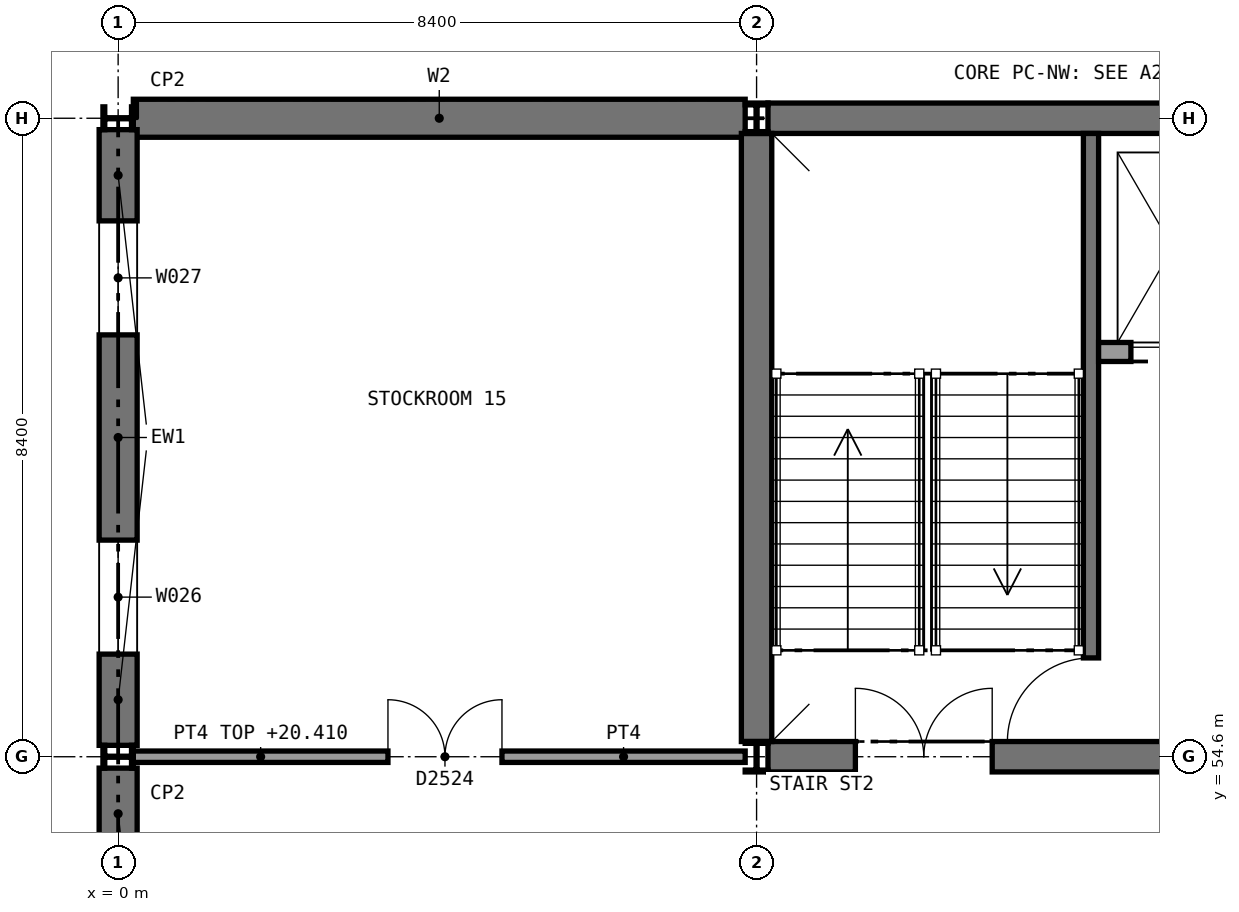
"""IFC4 building model, lengths in metres.
Left out: names, types, materials, properties, quantities, classifications, styles, units other than length and angle.
Written with IfcOpenShell. Run it as: python <this file> out.ifc"""

import sys

from ifc_helpers import new_model, si_unit, direction, frame, frame_2d, origin, origin_2d, place, context, subcontext, project, spatial, rectangle, i_section, extrude, element, fill, save


model = new_model("IFC4")
c1 = context("Model", 3, precision=1e-05, world=origin(), true_north=direction((0.0, 1.0)))
c2 = subcontext(c1, "Body", "Model", "MODEL_VIEW")
j1 = project(units=[si_unit("LENGTHUNIT", "METRE"), si_unit("PLANEANGLEUNIT", "RADIAN")], contexts=[c1])
p1 = place(None, origin())
s1 = spatial("IfcSite", under=j1, at=p1, CompositionType="ELEMENT")
p2 = place(p1, origin())
s2 = spatial("IfcBuilding", under=s1, at=p2, CompositionType="ELEMENT")
p3 = place(p2, frame((0.0, 0.0, 16.2)))
s3 = spatial("IfcBuildingStorey", under=s2, at=p3, CompositionType="ELEMENT", Elevation=16.2)
p4 = place(p3, frame((0.2, 63.0, 0.0), z_axis=(0.0, 0.0, 1.0), x_axis=(1.0, 0.0, 0.0)))
e1 = element("IfcWall", 1, at=p4, inside=s3, PredefinedType="SHEAR", context=c2, shape_type="SweptSolid", body=[
    extrude(rectangle(XDim=8.05, YDim=0.5, at=frame_2d((4.025, 0.0))), origin(), (0.0, 0.0, 1.0), 4.65),
])
p5 = place(p3, frame((8.55, 63.0, 0.0), z_axis=(0.0, 0.0, 1.0), x_axis=(1.0, 0.0, 0.0)))
e2 = element("IfcWall", 2, at=p5, inside=s3, PredefinedType="SHEAR", context=c2, shape_type="SweptSolid", body=[
    extrude(rectangle(XDim=8.1, YDim=0.4, at=frame_2d((4.05, 0.0))), origin(), (0.0, 0.0, 1.0), 4.65),
])
p6 = place(p3, frame((8.55, 54.6, 0.0), z_axis=(0.0, 0.0, 1.0), x_axis=(1.0, 0.0, 0.0)))
e3 = element("IfcWall", 3, at=p6, inside=s3, PredefinedType="SHEAR", context=c2, shape_type="SweptSolid", body=[
    extrude(rectangle(XDim=8.1, YDim=0.4, at=frame_2d((4.05, 0.0))), origin(), (0.0, 0.0, 1.0), 4.65),
])
p7 = place(p6, frame((1.15, 0.0, 0.0)))
e4 = element("IfcOpeningElement", 4, at=p7, cuts=e3, PredefinedType="OPENING", context=c2, shape_type="SweptSolid", body=[
    extrude(rectangle(XDim=1.8, YDim=2.1, at=frame_2d((0.9, 1.05))), frame((0.0, 0.21, 0.0), z_axis=(0.0, -1.0, 0.0), x_axis=(1.0, 0.0, 0.0)), (0.0, 0.0, 1.0), 0.42),
])
p8 = place(p6, frame((5.3, 0.0, 0.0)))
e5 = element("IfcOpeningElement", 5, at=p8, cuts=e3, PredefinedType="OPENING", context=c2, shape_type="SweptSolid", body=[
    extrude(rectangle(XDim=1.8, YDim=2.1, at=frame_2d((0.9, 1.05))), frame((0.0, 0.21, 0.0), z_axis=(0.0, -1.0, 0.0), x_axis=(1.0, 0.0, 0.0)), (0.0, 0.0, 1.0), 0.42),
])
p9 = place(p3, frame((8.4, 54.8, 0.0), z_axis=(0.0, 0.0, 1.0), x_axis=(0.0, 1.0, 0.0)))
e6 = element("IfcWall", 6, at=p9, inside=s3, PredefinedType="SHEAR", context=c2, shape_type="SweptSolid", body=[
    extrude(rectangle(XDim=8.0, YDim=0.4, at=frame_2d((4.0, 0.0))), origin(), (0.0, 0.0, 1.0), 4.65),
])
for number, where, z_axis, x_axis in (
    (7, (0.0, 54.6, 0.0), (0.0, 0.0, 1.0), (0.0, 1.0, 0.0)),
    (8, (0.0, 63.0, 0.0), (0.0, 0.0, 1.0), (0.0, 1.0, 0.0)),
    (9, (8.4, 54.6, 0.0), (0.0, 0.0, 1.0), (1.0, 0.0, 0.0)),
    (10, (8.4, 63.0, 0.0), (0.0, 0.0, 1.0), (1.0, 0.0, 0.0)),
):
    element("IfcColumn", number, at=place(p3, frame(where, z_axis=z_axis, x_axis=x_axis)), inside=s3, PredefinedType="COLUMN", context=c2, shape_type="SweptSolid", body=[
        extrude(i_section(OverallWidth=0.3, OverallDepth=0.4, WebThickness=0.013, FlangeThickness=0.024, FilletRadius=0.027, at=origin_2d()), origin(), (0.0, 0.0, 1.0), 4.8),
    ])
p10 = place(p3, frame((0.2, 54.6, 0.0), z_axis=(0.0, 0.0, 1.0), x_axis=(1.0, 0.0, 0.0)))
e11 = element("IfcWall", 11, at=p10, inside=s3, PredefinedType="SOLIDWALL", context=c2, shape_type="SweptSolid", body=[
    extrude(rectangle(XDim=8.05, YDim=0.15, at=frame_2d((4.025, 0.0))), origin(), (0.0, 0.0, 1.0), 4.21),
])
p11 = place(p10, frame((3.35, 0.0, 0.0)))
e12 = element("IfcOpeningElement", 12, at=p11, cuts=e11, PredefinedType="OPENING", context=c2, shape_type="SweptSolid", body=[
    extrude(rectangle(XDim=1.5, YDim=2.1, at=frame_2d((0.75, 1.05))), frame((0.0, 0.085, 0.0), z_axis=(0.0, -1.0, 0.0), x_axis=(1.0, 0.0, 0.0)), (0.0, 0.0, 1.0), 0.17),
])
p12 = place(p3, frame((0.0, 46.35, 0.0), z_axis=(0.0, 0.0, 1.0), x_axis=(0.0, 1.0, 0.0)))
e13 = element("IfcWall", 13, at=p12, inside=s3, PredefinedType="STANDARD", context=c2, shape_type="SweptSolid", body=[
    extrude(rectangle(XDim=8.1, YDim=0.5, at=frame_2d((4.05, 0.0))), origin(), (0.0, 0.0, 1.0), 4.65),
])
p13 = place(p12, frame((1.2, 0.0, 1.0)))
e14 = element("IfcOpeningElement", 14, at=p13, cuts=e13, PredefinedType="OPENING", context=c2, shape_type="SweptSolid", body=[
    extrude(rectangle(XDim=1.5, YDim=2.7, at=frame_2d((0.75, 1.35))), frame((0.0, 0.26, 0.0), z_axis=(0.0, -1.0, 0.0), x_axis=(1.0, 0.0, 0.0)), (0.0, 0.0, 1.0), 0.52),
])
p14 = place(p12, frame((5.4, 0.0, 1.0)))
e15 = element("IfcOpeningElement", 15, at=p14, cuts=e13, PredefinedType="OPENING", context=c2, shape_type="SweptSolid", body=[
    extrude(rectangle(XDim=1.5, YDim=2.7, at=frame_2d((0.75, 1.35))), frame((0.0, 0.26, 0.0), z_axis=(0.0, -1.0, 0.0), x_axis=(1.0, 0.0, 0.0)), (0.0, 0.0, 1.0), 0.52),
])
p15 = place(p3, frame((0.0, 54.75, 0.0), z_axis=(0.0, 0.0, 1.0), x_axis=(0.0, 1.0, 0.0)))
e16 = element("IfcWall", 16, at=p15, inside=s3, PredefinedType="STANDARD", context=c2, shape_type="SweptSolid", body=[
    extrude(rectangle(XDim=8.1, YDim=0.5, at=frame_2d((4.05, 0.0))), origin(), (0.0, 0.0, 1.0), 4.65),
])
p16 = place(p15, frame((1.2, 0.0, 1.0)))
e17 = element("IfcOpeningElement", 17, at=p16, cuts=e16, PredefinedType="OPENING", context=c2, shape_type="SweptSolid", body=[
    extrude(rectangle(XDim=1.5, YDim=2.7, at=frame_2d((0.75, 1.35))), frame((0.0, 0.26, 0.0), z_axis=(0.0, -1.0, 0.0), x_axis=(1.0, 0.0, 0.0)), (0.0, 0.0, 1.0), 0.52),
])
p17 = place(p15, frame((5.4, 0.0, 1.0)))
e18 = element("IfcOpeningElement", 18, at=p17, cuts=e16, PredefinedType="OPENING", context=c2, shape_type="SweptSolid", body=[
    extrude(rectangle(XDim=1.5, YDim=2.7, at=frame_2d((0.75, 1.35))), frame((0.0, 0.26, 0.0), z_axis=(0.0, -1.0, 0.0), x_axis=(1.0, 0.0, 0.0)), (0.0, 0.0, 1.0), 0.52),
])
p18 = place(p3, frame((12.8, 62.8, 0.0), z_axis=(0.0, 0.0, 1.0), x_axis=(0.0, -1.0, 0.0)))
e19 = element("IfcWall", 19, at=p18, inside=s3, PredefinedType="SHEAR", context=c2, shape_type="SweptSolid", body=[
    extrude(rectangle(XDim=8.0, YDim=0.2, at=frame_2d((4.0, 0.0))), origin(), (0.0, 0.0, 1.0), 4.65),
])
p19 = place(p18, frame((6.9, 0.0, 0.0)))
e20 = element("IfcOpeningElement", 20, at=p19, cuts=e19, PredefinedType="OPENING", context=c2, shape_type="SweptSolid", body=[
    extrude(rectangle(XDim=1.11, YDim=2.1, at=frame_2d((0.555, 1.05))), frame((0.0, 0.11, 0.0), z_axis=(0.0, -1.0, 0.0), x_axis=(1.0, 0.0, 0.0)), (0.0, 0.0, 1.0), 0.22),
])
p20 = place(p3, frame((12.9, 59.925, 0.0), z_axis=(0.0, 0.0, 1.0), x_axis=(1.0, 0.0, 0.0)))
e21 = element("IfcWall", 21, at=p20, inside=s3, PredefinedType="SOLIDWALL", context=c2, shape_type="SweptSolid", body=[
    extrude(rectangle(XDim=1.95, YDim=0.25, at=frame_2d((0.975, 0.0))), origin(), (0.0, 0.0, 1.0), 4.8),
])
p21 = place(p20, frame((0.425, 0.0, 0.0)))
e22 = element("IfcOpeningElement", 22, at=p21, cuts=e21, PredefinedType="OPENING", context=c2, shape_type="SweptSolid", body=[
    extrude(rectangle(XDim=1.1, YDim=2.1, at=frame_2d((0.55, 1.05))), frame((0.0, 0.135, 0.0), z_axis=(0.0, -1.0, 0.0), x_axis=(1.0, 0.0, 0.0)), (0.0, 0.0, 1.0), 0.27),
])
p22 = place(p11, origin())
e23 = element("IfcDoor", 23, at=p22, inside=s3, OperationType="DOUBLE_DOOR_SINGLE_SWING", PredefinedType="DOOR", context=c2, shape_type="SweptSolid", body=[
    extrude(rectangle(XDim=1.5, YDim=2.1, at=frame_2d((0.75, 1.05))), frame((0.0, 0.025, 0.0), z_axis=(0.0, -1.0, 0.0), x_axis=(1.0, 0.0, 0.0)), (0.0, 0.0, 1.0), 0.05),
])
fill(e12, e23)
p23 = place(p16, origin())
e24 = element("IfcWindow", 24, at=p23, inside=s3, PartitioningType="SINGLE_PANEL", PredefinedType="WINDOW", context=c2, shape_type="SweptSolid", body=[
    extrude(rectangle(XDim=1.5, YDim=2.7, at=frame_2d((0.75, 1.35))), frame((0.0, 0.03, 0.0), z_axis=(0.0, -1.0, 0.0), x_axis=(1.0, 0.0, 0.0)), (0.0, 0.0, 1.0), 0.06),
])
fill(e17, e24)
p24 = place(p17, origin())
e25 = element("IfcWindow", 25, at=p24, inside=s3, PartitioningType="SINGLE_PANEL", PredefinedType="WINDOW", context=c2, shape_type="SweptSolid", body=[
    extrude(rectangle(XDim=1.5, YDim=2.7, at=frame_2d((0.75, 1.35))), frame((0.0, 0.03, 0.0), z_axis=(0.0, -1.0, 0.0), x_axis=(1.0, 0.0, 0.0)), (0.0, 0.0, 1.0), 0.06),
])
fill(e18, e25)
p25 = place(p19, frame((1.1, 0.0, 0.0), z_axis=(0.0, 0.0, 1.0), x_axis=(-1.0, 0.0, 0.0)))
e26 = element("IfcDoor", 26, at=p25, inside=s3, OperationType="SINGLE_SWING_LEFT", PredefinedType="DOOR", context=c2, shape_type="SweptSolid", body=[
    extrude(rectangle(XDim=1.1, YDim=2.1, at=frame_2d((0.55, 1.05))), frame((0.0, 0.025, 0.0), z_axis=(0.0, -1.0, 0.0), x_axis=(1.0, 0.0, 0.0)), (0.0, 0.0, 1.0), 0.05),
])
fill(e20, e26)
p26 = place(p21, frame((1.1, 0.0, 0.0), z_axis=(0.0, 0.0, 1.0), x_axis=(-1.0, 0.0, 0.0)))
e27 = element("IfcDoor", 27, at=p26, inside=s3, OperationType="SLIDING_TO_RIGHT", PredefinedType="DOOR", context=c2, shape_type="SweptSolid", body=[
    extrude(rectangle(XDim=1.1, YDim=2.1, at=frame_2d((0.55, 1.05))), frame((0.0, 0.025, 0.0), z_axis=(0.0, -1.0, 0.0), x_axis=(1.0, 0.0, 0.0)), (0.0, 0.0, 1.0), 0.05),
])
fill(e22, e27)
p27 = place(p7, origin())
e28 = element("IfcDoor", 28, at=p27, inside=s3, OperationType="DOUBLE_DOOR_SINGLE_SWING", PredefinedType="DOOR", context=c2, shape_type="SweptSolid", body=[
    extrude(rectangle(XDim=1.8, YDim=2.1, at=frame_2d((0.9, 1.05))), frame((0.0, 0.025, 0.0), z_axis=(0.0, -1.0, 0.0), x_axis=(1.0, 0.0, 0.0)), (0.0, 0.0, 1.0), 0.05),
])
fill(e4, e28)
save(model, sys.argv[1])
